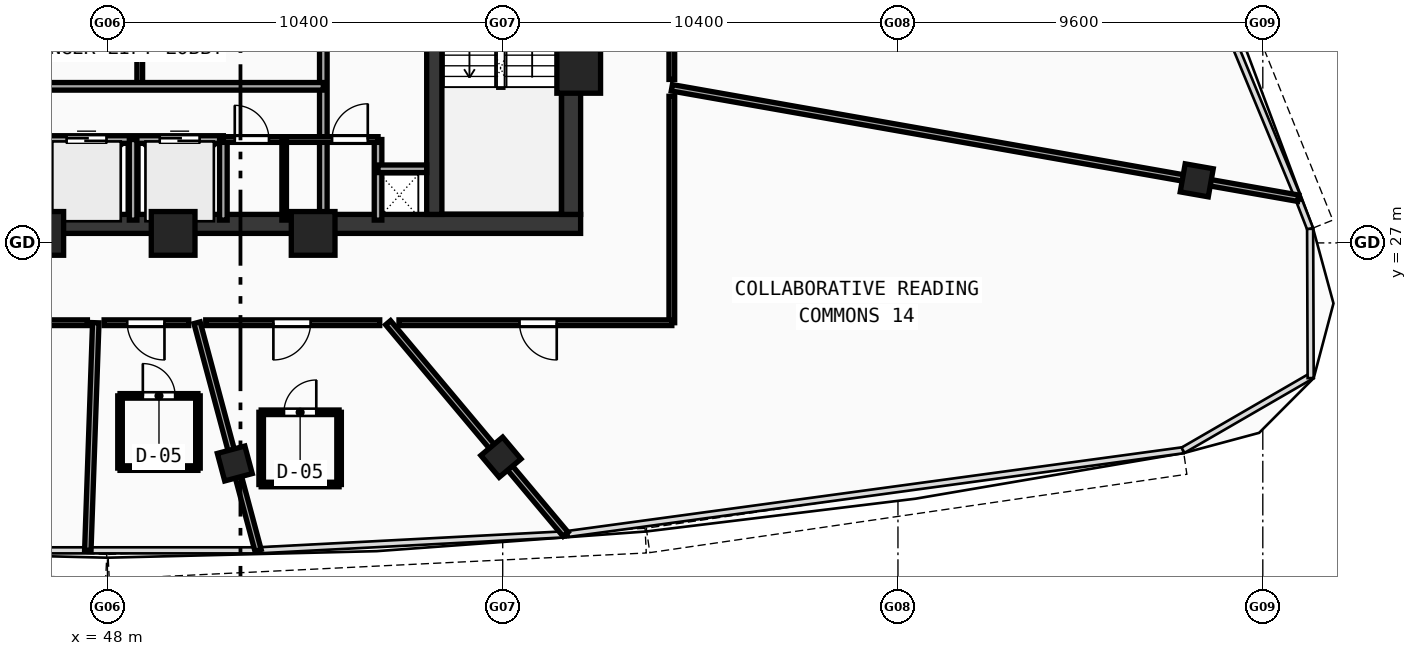
"""IFC4 building model, lengths in metres.
Left out: names, types, materials, properties, quantities, classifications, styles, units other than length and angle.
Written with IfcOpenShell. Run it as: python <this file> out.ifc"""

import sys

from ifc_helpers import new_model, si_unit, direction, frame, frame_2d, origin, origin_with_axes, origin_2d, place, context, subcontext, project, spatial, rectangle, hollow_rectangle, extrude, source, transform, mapped, element, fill, save


model = new_model("IFC4")
c1 = context("Model", 3, precision=1e-05, world=origin(), true_north=direction((0.0, 1.0)))
c2 = subcontext(c1, "Body", "Model", "MODEL_VIEW")
j1 = project(units=[si_unit("LENGTHUNIT", "METRE"), si_unit("PLANEANGLEUNIT", "RADIAN")], contexts=[c1])
p1 = place(None, origin())
s1 = spatial("IfcSite", under=j1, at=p1, CompositionType="ELEMENT")
p2 = place(p1, origin())
s2 = spatial("IfcBuilding", under=s1, at=p2, CompositionType="ELEMENT")
p3 = place(p2, frame((0.0, 0.0, 288.75)))
s3 = spatial("IfcBuildingStorey", under=s2, at=p3, CompositionType="ELEMENT", Elevation=288.75)
p4 = place(p3, frame((35.55, 27.5, 0.0), z_axis=(0.0, 0.0, 1.0), x_axis=(1.0, 0.0, 0.0)))
e1 = element("IfcWall", 1, at=p4, inside=s3, PredefinedType="SHEAR", context=c2, shape_type="SweptSolid", body=[
    extrude(rectangle(XDim=24.9, YDim=0.5, at=frame_2d((12.45, 0.0))), origin(), (0.0, 0.0, 1.0), 3.47),
])
p5 = place(p3, frame((60.2, 27.75, 0.0), z_axis=(0.0, 0.0, 1.0), x_axis=(0.0, 1.0, 0.0)))
e2 = element("IfcWall", 2, at=p5, inside=s3, PredefinedType="SHEAR", context=c2, shape_type="SweptSolid", body=[
    extrude(rectangle(XDim=12.2, YDim=0.5, at=frame_2d((6.1, 0.0))), origin(), (0.0, 0.0, 1.0), 3.47),
])
p6 = place(p3, frame((56.6, 27.75, 0.0), z_axis=(0.0, 0.0, 1.0), x_axis=(0.0, 1.0, 0.0)))
e3 = element("IfcWall", 3, at=p6, inside=s3, PredefinedType="SHEAR", context=c2, shape_type="SweptSolid", body=[
    extrude(rectangle(XDim=12.2, YDim=0.4, at=frame_2d((6.1, 0.0))), origin(), (0.0, 0.0, 1.0), 3.47),
])
p7 = place(p6, frame((10.0, 0.0, 0.0)))
e4 = element("IfcOpeningElement", 4, at=p7, cuts=e3, PredefinedType="OPENING", context=c2, shape_type="SweptSolid", body=[
    extrude(rectangle(XDim=1.1, YDim=2.1, at=frame_2d((0.55, 1.05))), frame((0.0, 0.21, 0.0), z_axis=(0.0, -1.0, 0.0), x_axis=(1.0, 0.0, 0.0)), (0.0, 0.0, 1.0), 0.42),
])
m1 = source(origin(), c2, "Body", "SweptSolid", [
    extrude(hollow_rectangle(XDim=1.15, YDim=1.15, WallThickness=0.048, at=origin_2d()), origin(), (0.0, 0.0, 1.0), 3.73),
])
for number, where, z_axis, x_axis in (
    (5, (46.272, 27.25, -0.26), (0.0, 0.0, 1.0), (1.0, 0.0, 0.0)),
    (6, (49.729, 27.25, -0.26), (0.0, 0.0, 1.0), (1.0, 0.0, 0.0)),
    (7, (53.412, 27.25, -0.26), (0.0, 0.0, 1.0), (1.0, 0.0, 0.0)),
    (8, (60.4, 31.513, -0.26), (0.0, 0.0, 1.0), (1.0, 0.0, 0.0)),
):
    element("IfcColumn", number, at=place(p3, frame(where, z_axis=z_axis, x_axis=x_axis)), inside=s3, PredefinedType="COLUMN", context=c2, shape_type="MappedRepresentation", body=[
        mapped(m1, transform((0.0, 0.0, 0.0), scale=1.0)),
    ])
m2 = source(origin(), c2, "Body", "SweptSolid", [
    extrude(hollow_rectangle(XDim=0.75, YDim=0.75, WallThickness=0.028, at=origin_2d()), origin(), (0.0, 0.0, 1.0), 3.73),
])
for number, where, z_axis, x_axis in (
    (9, (51.351, 21.196, -0.26), (0.0, 0.0, 1.0), (0.966, 0.259, 0.0)),
    (10, (58.354, 21.362, -0.26), (0.0, 0.0, 1.0), (0.766, 0.643, 0.0)),
    (11, (76.662, 28.646, -0.26), (0.0, 0.0, 1.0), (0.174, 0.985, 0.0)),
):
    element("IfcColumn", number, at=place(p3, frame(where, z_axis=z_axis, x_axis=x_axis)), inside=s3, PredefinedType="COLUMN", context=c2, shape_type="MappedRepresentation", body=[
        mapped(m2, transform((0.0, 0.0, 0.0), scale=1.0)),
    ])
p8 = place(p3, frame((53.68, 27.6, 0.0), z_axis=(0.0, 0.0, 1.0), x_axis=(0.0, 1.0, 0.0)))
e12 = element("IfcWall", 12, at=p8, inside=s3, PredefinedType="SOLIDWALL", context=c2, shape_type="SweptSolid", body=[
    extrude(rectangle(XDim=9.05, YDim=0.2, at=frame_2d((4.525, 0.0))), origin(), (0.0, 0.0, 1.0), 3.47),
])
p9 = place(p8, frame((6.9, 0.0, 0.0)))
e13 = element("IfcOpeningElement", 13, at=p9, cuts=e12, PredefinedType="OPENING", context=c2, shape_type="SweptSolid", body=[
    extrude(rectangle(XDim=1.05, YDim=2.1, at=frame_2d((0.525, 1.05))), frame((0.0, 0.11, 0.0), z_axis=(0.0, -1.0, 0.0), x_axis=(1.0, 0.0, 0.0)), (0.0, 0.0, 1.0), 0.22),
])
p10 = place(p3, frame((48.85, 31.12, 0.0), z_axis=(0.0, 0.0, 1.0), x_axis=(0.0, 1.0, 0.0)))
e14 = element("IfcWall", 14, at=p10, inside=s3, PredefinedType="PARTITIONING", context=c2, shape_type="SweptSolid", body=[
    extrude(rectangle(XDim=2.7, YDim=0.15, at=frame_2d((1.35, 0.0))), origin(), (0.0, 0.0, 1.0), 3.47),
])
p11 = place(p3, frame((43.85, 29.72, 0.0), z_axis=(0.0, 0.0, 1.0), x_axis=(1.0, 0.0, 0.0)))
e15 = element("IfcWall", 15, at=p11, inside=s3, PredefinedType="SOLIDWALL", context=c2, shape_type="SweptSolid", body=[
    extrude(rectangle(XDim=7.2, YDim=0.2, at=frame_2d((3.6, 0.0))), origin(), (0.0, 0.0, 1.0), 3.47),
])
p12 = place(p11, frame((0.625, 0.0, 0.0)))
e16 = element("IfcOpeningElement", 16, at=p12, cuts=e15, PredefinedType="OPENING", context=c2, shape_type="SweptSolid", body=[
    extrude(rectangle(XDim=1.05, YDim=2.1, at=frame_2d((0.525, 1.05))), frame((0.0, 0.11, 0.0), z_axis=(0.0, -1.0, 0.0), x_axis=(1.0, 0.0, 0.0)), (0.0, 0.0, 1.0), 0.22),
])
p13 = place(p11, frame((3.075, 0.0, 0.0)))
e17 = element("IfcOpeningElement", 17, at=p13, cuts=e15, PredefinedType="OPENING", context=c2, shape_type="SweptSolid", body=[
    extrude(rectangle(XDim=1.05, YDim=2.1, at=frame_2d((0.525, 1.05))), frame((0.0, 0.11, 0.0), z_axis=(0.0, -1.0, 0.0), x_axis=(1.0, 0.0, 0.0)), (0.0, 0.0, 1.0), 0.22),
])
p14 = place(p11, frame((5.525, 0.0, 0.0)))
e18 = element("IfcOpeningElement", 18, at=p14, cuts=e15, PredefinedType="OPENING", context=c2, shape_type="SweptSolid", body=[
    extrude(rectangle(XDim=1.05, YDim=2.1, at=frame_2d((0.525, 1.05))), frame((0.0, 0.11, 0.0), z_axis=(0.0, -1.0, 0.0), x_axis=(1.0, 0.0, 0.0)), (0.0, 0.0, 1.0), 0.22),
])
p15 = place(p3, frame((51.05, 27.6, 0.0), z_axis=(0.0, 0.0, 1.0), x_axis=(0.0, 1.0, 0.0)))
e19 = element("IfcWall", 19, at=p15, inside=s3, PredefinedType="SOLIDWALL", context=c2, shape_type="SweptSolid", body=[
    extrude(rectangle(XDim=2.12, YDim=0.2, at=frame_2d((1.06, 0.0))), origin(), (0.0, 0.0, 1.0), 3.47),
])
p16 = place(p3, frame((43.85, 31.12, 0.0), z_axis=(0.0, 0.0, 1.0), x_axis=(1.0, 0.0, 0.0)))
e20 = element("IfcWall", 20, at=p16, inside=s3, PredefinedType="SOLIDWALL", context=c2, shape_type="SweptSolid", body=[
    extrude(rectangle(XDim=9.83, YDim=0.2, at=frame_2d((4.915, 0.0))), origin(), (0.0, 0.0, 1.0), 3.47),
])
for number, where, z_axis, x_axis in (
    (21, (48.675, 27.6, 0.0), (0.0, 0.0, 1.0), (0.0, 1.0, 0.0)),
    (22, (55.12, 27.6, 0.0), (0.0, 0.0, 1.0), (0.0, 1.0, 0.0)),
):
    element("IfcWall", number, at=place(p3, frame(where, z_axis=z_axis, x_axis=x_axis)), inside=s3, PredefinedType="SOLIDWALL", context=c2, shape_type="SweptSolid", body=[
        extrude(rectangle(XDim=2.12, YDim=0.2, at=frame_2d((1.06, 0.0))), origin(), (0.0, 0.0, 1.0), 3.47),
    ])
p17 = place(p3, frame((55.12, 28.95, 0.0), z_axis=(0.0, 0.0, 1.0), x_axis=(1.0, 0.0, 0.0)))
e23 = element("IfcWall", 23, at=p17, inside=s3, PredefinedType="SOLIDWALL", context=c2, shape_type="SweptSolid", body=[
    extrude(rectangle(XDim=1.28, YDim=0.2, at=frame_2d((0.64, 0.0))), origin(), (0.0, 0.0, 1.0), 3.47),
])
p18 = place(p3, frame((51.05, 29.72, 0.0), z_axis=(0.0, 0.0, 1.0), x_axis=(1.0, 0.0, 0.0)))
e24 = element("IfcWall", 24, at=p18, inside=s3, PredefinedType="PARTITIONING", context=c2, shape_type="SweptSolid", body=[
    extrude(rectangle(XDim=4.07, YDim=0.15, at=frame_2d((2.035, 0.0))), origin(), (0.0, 0.0, 1.0), 3.47),
])
p19 = place(p18, frame((0.3, 0.0, 0.0)))
e25 = element("IfcOpeningElement", 25, at=p19, cuts=e24, PredefinedType="OPENING", context=c2, shape_type="SweptSolid", body=[
    extrude(rectangle(XDim=0.9, YDim=2.1, at=frame_2d((0.45, 1.05))), frame((0.0, 0.085, 0.0), z_axis=(0.0, -1.0, 0.0), x_axis=(1.0, 0.0, 0.0)), (0.0, 0.0, 1.0), 0.17),
])
p20 = place(p18, frame((2.86, 0.0, 0.0)))
e26 = element("IfcOpeningElement", 26, at=p20, cuts=e24, PredefinedType="OPENING", context=c2, shape_type="SweptSolid", body=[
    extrude(rectangle(XDim=0.94, YDim=2.1, at=frame_2d((0.47, 1.05))), frame((0.0, 0.085, 0.0), z_axis=(0.0, -1.0, 0.0), x_axis=(1.0, 0.0, 0.0)), (0.0, 0.0, 1.0), 0.17),
])
p21 = place(p3, frame((52.65, 27.6, 0.0), z_axis=(0.0, 0.0, 1.0), x_axis=(0.0, 1.0, 0.0)))
e27 = element("IfcWall", 27, at=p21, inside=s3, PredefinedType="PARTITIONING", context=c2, shape_type="SweptSolid", body=[
    extrude(rectangle(XDim=2.12, YDim=0.12, at=frame_2d((1.06, 0.0))), origin(), (0.0, 0.0, 1.0), 3.47),
])
p22 = place(p3, frame((47.693, 24.9, 0.0), z_axis=(0.0, 0.0, 1.0), x_axis=(-0.034912666906, -0.999390367019, 0.0)))
e28 = element("IfcWall", 28, at=p22, inside=s3, PredefinedType="PARTITIONING", context=c2, shape_type="SweptSolid", body=[
    extrude(rectangle(XDim=5.993, YDim=0.17, at=frame_2d((2.997, 0.0))), origin(), (0.0, 0.0, 1.0), 2.87),
])
p23 = place(p3, frame((50.358, 24.9, 0.0), z_axis=(0.0, 0.0, 1.0), x_axis=(0.258843673448, -0.965919226807, 0.0)))
e29 = element("IfcWall", 29, at=p23, inside=s3, PredefinedType="PARTITIONING", context=c2, shape_type="SweptSolid", body=[
    extrude(rectangle(XDim=6.201, YDim=0.17, at=frame_2d((3.1, 0.0))), origin(), (0.0, 0.0, 1.0), 2.87),
])
p24 = place(p3, frame((55.384, 24.9, 0.0), z_axis=(0.0, 0.0, 1.0), x_axis=(0.642798027821, -0.766035701146, 0.0)))
e30 = element("IfcWall", 30, at=p24, inside=s3, PredefinedType="PARTITIONING", context=c2, shape_type="SweptSolid", body=[
    extrude(rectangle(XDim=7.267, YDim=0.17, at=frame_2d((3.633, 0.0))), origin(), (0.0, 0.0, 1.0), 2.87),
])
p25 = place(p3, frame((62.85, 31.082, 0.0), z_axis=(0.0, 0.0, 1.0), x_axis=(0.984806900178, -0.173653014261, 0.0)))
e31 = element("IfcWall", 31, at=p25, inside=s3, PredefinedType="PARTITIONING", context=c2, shape_type="SweptSolid", body=[
    extrude(rectangle(XDim=16.736, YDim=0.17, at=frame_2d((8.368, 0.0))), origin(), (0.0, 0.0, 1.0), 2.87),
])
p26 = place(p3, frame((62.85, 38.305, 0.0), z_axis=(0.0, 0.0, 1.0), x_axis=(0.0, -1.0, 0.0)))
e32 = element("IfcWall", 32, at=p26, inside=s3, PredefinedType="PARTITIONING", context=c2, shape_type="SweptSolid", body=[
    extrude(rectangle(XDim=7.004, YDim=0.15, at=frame_2d((3.502, 0.0))), origin(), (0.0, 0.0, 1.0), 3.47),
])
p27 = place(p26, frame((3.042, 0.0, 0.0)))
e33 = element("IfcOpeningElement", 33, at=p27, cuts=e32, PredefinedType="OPENING", context=c2, shape_type="SweptSolid", body=[
    extrude(rectangle(XDim=0.92, YDim=2.1, at=frame_2d((0.46, 1.05))), frame((0.0, 0.085, 0.0), z_axis=(0.0, -1.0, 0.0), x_axis=(1.0, 0.0, 0.0)), (0.0, 0.0, 1.0), 0.17),
])
p28 = place(p3, frame((62.85, 30.858, 0.0), z_axis=(0.0, 0.0, 1.0), x_axis=(0.0, -1.0, 0.0)))
e34 = element("IfcWall", 34, at=p28, inside=s3, PredefinedType="PARTITIONING", context=c2, shape_type="SweptSolid", body=[
    extrude(rectangle(XDim=5.958, YDim=0.15, at=frame_2d((2.979, 0.0))), origin(), (0.0, 0.0, 1.0), 3.12),
])
p29 = place(p3, frame((62.85, 24.9, 0.0), z_axis=(0.0, 0.0, 1.0), x_axis=(-1.0, 0.0, 0.0)))
e35 = element("IfcWall", 35, at=p29, inside=s3, PredefinedType="PARTITIONING", context=c2, shape_type="SweptSolid", body=[
    extrude(rectangle(XDim=7.179, YDim=0.15, at=frame_2d((3.589, 0.0))), origin(), (0.0, 0.0, 1.0), 3.12),
])
p30 = place(p29, frame((3.028, 0.0, 0.0)))
e36 = element("IfcOpeningElement", 36, at=p30, cuts=e35, PredefinedType="OPENING", context=c2, shape_type="SweptSolid", body=[
    extrude(rectangle(XDim=0.98, YDim=2.12, at=frame_2d((0.49, 1.06))), frame((0.0, 0.085, 0.0), z_axis=(0.0, -1.0, 0.0), x_axis=(1.0, 0.0, 0.0)), (0.0, 0.0, 1.0), 0.17),
])
p31 = place(p3, frame((55.164, 24.9, 0.0), z_axis=(0.0, 0.0, 1.0), x_axis=(-1.0, 0.0, 0.0)))
e37 = element("IfcWall", 37, at=p31, inside=s3, PredefinedType="PARTITIONING", context=c2, shape_type="SweptSolid", body=[
    extrude(rectangle(XDim=4.579, YDim=0.15, at=frame_2d((2.289, 0.0))), origin(), (0.0, 0.0, 1.0), 3.47),
])
p32 = place(p31, frame((1.818, 0.0, 0.0)))
e38 = element("IfcOpeningElement", 38, at=p32, cuts=e37, PredefinedType="OPENING", context=c2, shape_type="SweptSolid", body=[
    extrude(rectangle(XDim=0.98, YDim=2.12, at=frame_2d((0.49, 1.06))), frame((0.0, 0.085, 0.0), z_axis=(0.0, -1.0, 0.0), x_axis=(1.0, 0.0, 0.0)), (0.0, 0.0, 1.0), 0.17),
])
p33 = place(p3, frame((50.138, 24.9, 0.0), z_axis=(0.0, 0.0, 1.0), x_axis=(-1.0, 0.0, 0.0)))
e39 = element("IfcWall", 39, at=p33, inside=s3, PredefinedType="PARTITIONING", context=c2, shape_type="SweptSolid", body=[
    extrude(rectangle(XDim=2.226, YDim=0.15, at=frame_2d((1.113, 0.0))), origin(), (0.0, 0.0, 1.0), 3.12),
])
p34 = place(p33, frame((0.638, 0.0, 0.0)))
e40 = element("IfcOpeningElement", 40, at=p34, cuts=e39, PredefinedType="OPENING", context=c2, shape_type="SweptSolid", body=[
    extrude(rectangle(XDim=0.98, YDim=2.12, at=frame_2d((0.49, 1.06))), frame((0.0, 0.085, 0.0), z_axis=(0.0, -1.0, 0.0), x_axis=(1.0, 0.0, 0.0)), (0.0, 0.0, 1.0), 0.17),
])
p35 = place(p3, frame((47.473, 24.9, 0.0), z_axis=(0.0, 0.0, 1.0), x_axis=(-1.0, 0.0, 0.0)))
e41 = element("IfcWall", 41, at=p35, inside=s3, PredefinedType="PARTITIONING", context=c2, shape_type="SweptSolid", body=[
    extrude(rectangle(XDim=6.637, YDim=0.15, at=frame_2d((3.318, 0.0))), origin(), (0.0, 0.0, 1.0), 2.87),
])
p36 = place(p35, frame((2.843, 0.0, 0.0)))
e42 = element("IfcOpeningElement", 42, at=p36, cuts=e41, PredefinedType="OPENING", context=c2, shape_type="SweptSolid", body=[
    extrude(rectangle(XDim=0.98, YDim=2.12, at=frame_2d((0.49, 1.06))), frame((0.0, 0.085, 0.0), z_axis=(0.0, -1.0, 0.0), x_axis=(1.0, 0.0, 0.0)), (0.0, 0.0, 1.0), 0.17),
])
p37 = place(p3, frame((48.331, 21.075, 0.0), z_axis=(0.0, 0.0, 1.0), x_axis=(1.0, 0.0, 0.0)))
e43 = element("IfcWall", 43, at=p37, inside=s3, PredefinedType="PARTITIONING", context=c2, shape_type="SweptSolid", body=[
    extrude(rectangle(XDim=2.05, YDim=0.12, at=frame_2d((1.025, 0.0))), origin(), (0.0, 0.0, 1.0), 2.87),
])
p38 = place(p3, frame((50.381, 21.075, 0.0), z_axis=(0.0, 0.0, 1.0), x_axis=(0.0, 1.0, 0.0)))
e44 = element("IfcWall", 44, at=p38, inside=s3, PredefinedType="PARTITIONING", context=c2, shape_type="SweptSolid", body=[
    extrude(rectangle(XDim=1.9, YDim=0.12, at=frame_2d((0.95, 0.0))), origin(), (0.0, 0.0, 1.0), 2.87),
])
p39 = place(p3, frame((50.381, 22.975, 0.0), z_axis=(0.0, 0.0, 1.0), x_axis=(-1.0, 0.0, 0.0)))
e45 = element("IfcWall", 45, at=p39, inside=s3, PredefinedType="PARTITIONING", context=c2, shape_type="SweptSolid", body=[
    extrude(rectangle(XDim=2.05, YDim=0.12, at=frame_2d((1.025, 0.0))), origin(), (0.0, 0.0, 1.0), 3.12),
])
p40 = place(p39, frame((0.6, 0.0, 0.0)))
e46 = element("IfcOpeningElement", 46, at=p40, cuts=e45, PredefinedType="OPENING", context=c2, shape_type="SweptSolid", body=[
    extrude(rectangle(XDim=0.85, YDim=2.1, at=frame_2d((0.425, 1.05))), frame((0.0, 0.07, 0.0), z_axis=(0.0, -1.0, 0.0), x_axis=(1.0, 0.0, 0.0)), (0.0, 0.0, 1.0), 0.14),
])
p41 = place(p3, frame((48.331, 22.975, 0.0), z_axis=(0.0, 0.0, 1.0), x_axis=(0.0, -1.0, 0.0)))
e47 = element("IfcWall", 47, at=p41, inside=s3, PredefinedType="PARTITIONING", context=c2, shape_type="SweptSolid", body=[
    extrude(rectangle(XDim=1.9, YDim=0.12, at=frame_2d((0.95, 0.0))), origin(), (0.0, 0.0, 1.0), 2.87),
])
p42 = place(p3, frame((52.045, 20.643, 0.0), z_axis=(0.0, 0.0, 1.0), x_axis=(1.0, 0.0, 0.0)))
e48 = element("IfcWall", 48, at=p42, inside=s3, PredefinedType="PARTITIONING", context=c2, shape_type="SweptSolid", body=[
    extrude(rectangle(XDim=2.05, YDim=0.12, at=frame_2d((1.025, 0.0))), origin(), (0.0, 0.0, 1.0), 3.47),
])
p43 = place(p3, frame((54.095, 20.643, 0.0), z_axis=(0.0, 0.0, 1.0), x_axis=(0.0, 1.0, 0.0)))
e49 = element("IfcWall", 49, at=p43, inside=s3, PredefinedType="PARTITIONING", context=c2, shape_type="SweptSolid", body=[
    extrude(rectangle(XDim=1.9, YDim=0.12, at=frame_2d((0.95, 0.0))), origin(), (0.0, 0.0, 1.0), 2.87),
])
p44 = place(p3, frame((54.095, 22.543, 0.0), z_axis=(0.0, 0.0, 1.0), x_axis=(-1.0, 0.0, 0.0)))
e50 = element("IfcWall", 50, at=p44, inside=s3, PredefinedType="PARTITIONING", context=c2, shape_type="SweptSolid", body=[
    extrude(rectangle(XDim=2.05, YDim=0.12, at=frame_2d((1.025, 0.0))), origin(), (0.0, 0.0, 1.0), 3.47),
])
p45 = place(p44, frame((0.6, 0.0, 0.0)))
e51 = element("IfcOpeningElement", 51, at=p45, cuts=e50, PredefinedType="OPENING", context=c2, shape_type="SweptSolid", body=[
    extrude(rectangle(XDim=0.85, YDim=2.1, at=frame_2d((0.425, 1.05))), frame((0.0, 0.07, 0.0), z_axis=(0.0, -1.0, 0.0), x_axis=(1.0, 0.0, 0.0)), (0.0, 0.0, 1.0), 0.14),
])
p46 = place(p3, frame((52.045, 22.543, 0.0), z_axis=(0.0, 0.0, 1.0), x_axis=(0.0, -1.0, 0.0)))
e52 = element("IfcWall", 52, at=p46, inside=s3, PredefinedType="PARTITIONING", context=c2, shape_type="SweptSolid", body=[
    extrude(rectangle(XDim=1.9, YDim=0.12, at=frame_2d((0.95, 0.0))), origin(), (0.0, 0.0, 1.0), 2.87),
])
m3 = source(origin(), c2, "Body", "SweptSolid", [
    extrude(rectangle(XDim=1.05, YDim=2.1, at=frame_2d((0.525, 1.05))), frame((0.0, 0.025, 0.0), z_axis=(0.0, -1.0, 0.0), x_axis=(1.0, 0.0, 0.0)), (0.0, 0.0, 1.0), 0.05),
])
p47 = place(p13, origin_with_axes())
e53 = element("IfcDoor", 53, at=p47, inside=s3, OperationType="DOUBLE_DOOR_SLIDING", PredefinedType="DOOR", context=c2, shape_type="MappedRepresentation", body=[
    mapped(m3, transform((0.0, 0.0, 0.0), scale=1.0)),
])
fill(e17, e53)
p48 = place(p14, origin_with_axes())
e54 = element("IfcDoor", 54, at=p48, inside=s3, OperationType="DOUBLE_DOOR_SLIDING", PredefinedType="DOOR", context=c2, shape_type="MappedRepresentation", body=[
    mapped(m3, transform((0.0, 0.0, 0.0), scale=1.0)),
])
fill(e18, e54)
m4 = source(origin(), c2, "Body", "SweptSolid", [
    extrude(rectangle(XDim=0.9, YDim=2.1, at=frame_2d((0.45, 1.05))), frame((0.0, 0.025, 0.0), z_axis=(0.0, -1.0, 0.0), x_axis=(1.0, 0.0, 0.0)), (0.0, 0.0, 1.0), 0.05),
])
p49 = place(p19, origin_with_axes())
e55 = element("IfcDoor", 55, at=p49, inside=s3, OperationType="SINGLE_SWING_LEFT", PredefinedType="DOOR", context=c2, shape_type="MappedRepresentation", body=[
    mapped(m4, transform((0.0, 0.0, 0.0), scale=1.0)),
])
fill(e25, e55)
m5 = source(origin(), c2, "Body", "SweptSolid", [
    extrude(rectangle(XDim=0.94, YDim=2.1, at=frame_2d((0.47, 1.05))), frame((0.0, 0.025, 0.0), z_axis=(0.0, -1.0, 0.0), x_axis=(1.0, 0.0, 0.0)), (0.0, 0.0, 1.0), 0.05),
])
p50 = place(p20, origin_with_axes())
e56 = element("IfcDoor", 56, at=p50, inside=s3, OperationType="SINGLE_SWING_RIGHT", PredefinedType="DOOR", context=c2, shape_type="MappedRepresentation", body=[
    mapped(m5, transform((0.0, 0.0, 0.0), scale=1.0)),
])
fill(e26, e56)
m6 = source(origin(), c2, "Body", "SweptSolid", [
    extrude(rectangle(XDim=0.98, YDim=2.12, at=frame_2d((0.49, 1.06))), frame((0.0, 0.025, 0.0), z_axis=(0.0, -1.0, 0.0), x_axis=(1.0, 0.0, 0.0)), (0.0, 0.0, 1.0), 0.05),
])
p51 = place(p34, origin_with_axes())
e57 = element("IfcDoor", 57, at=p51, inside=s3, OperationType="SINGLE_SWING_LEFT", PredefinedType="DOOR", context=c2, shape_type="MappedRepresentation", body=[
    mapped(m6, transform((0.0, 0.0, 0.0), scale=1.0)),
])
fill(e40, e57)
m7 = source(origin(), c2, "Body", "SweptSolid", [
    extrude(rectangle(XDim=0.85, YDim=2.1, at=frame_2d((0.425, 1.05))), frame((0.0, 0.025, 0.0), z_axis=(0.0, -1.0, 0.0), x_axis=(1.0, 0.0, 0.0)), (0.0, 0.0, 1.0), 0.05),
])
p52 = place(p40, frame((0.85, 0.0, 0.0), z_axis=(0.0, 0.0, 1.0), x_axis=(-1.0, 0.0, 0.0)))
e58 = element("IfcDoor", 58, at=p52, inside=s3, OperationType="SINGLE_SWING_LEFT", PredefinedType="DOOR", context=c2, shape_type="MappedRepresentation", body=[
    mapped(m7, transform((0.0, 0.0, 0.0), scale=1.0)),
])
fill(e46, e58)
p53 = place(p32, origin_with_axes())
e59 = element("IfcDoor", 59, at=p53, inside=s3, OperationType="SINGLE_SWING_RIGHT", PredefinedType="DOOR", context=c2, shape_type="MappedRepresentation", body=[
    mapped(m6, transform((0.0, 0.0, 0.0), scale=1.0)),
])
fill(e38, e59)
p54 = place(p45, frame((0.85, 0.0, 0.0), z_axis=(0.0, 0.0, 1.0), x_axis=(-1.0, 0.0, 0.0)))
e60 = element("IfcDoor", 60, at=p54, inside=s3, OperationType="SINGLE_SWING_RIGHT", PredefinedType="DOOR", context=c2, shape_type="MappedRepresentation", body=[
    mapped(m7, transform((0.0, 0.0, 0.0), scale=1.0)),
])
fill(e51, e60)
p55 = place(p30, origin_with_axes())
e61 = element("IfcDoor", 61, at=p55, inside=s3, OperationType="SINGLE_SWING_LEFT", PredefinedType="DOOR", context=c2, shape_type="MappedRepresentation", body=[
    mapped(m6, transform((0.0, 0.0, 0.0), scale=1.0)),
])
fill(e36, e61)
save(model, sys.argv[1])
